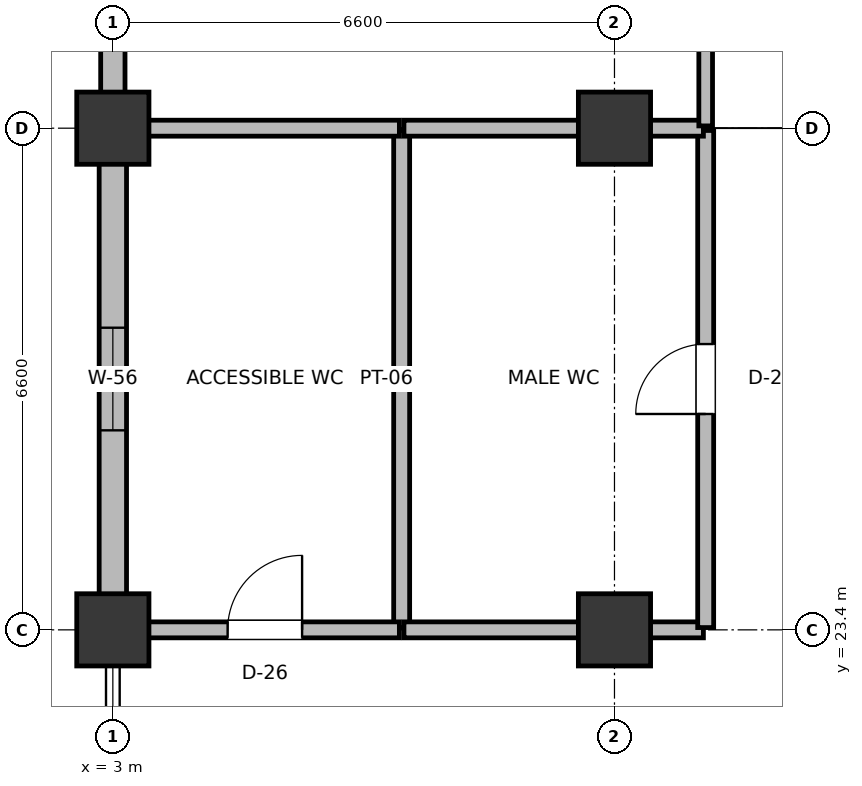
"""IFC4 building model, lengths in metres.
Left out: names, types, materials, properties, quantities, classifications, styles, units other than length and angle.
Written with IfcOpenShell. Run it as: python <this file> out.ifc"""

import sys

from ifc_helpers import new_model, si_unit, direction, frame, frame_2d, origin, origin_2d, place, context, subcontext, project, spatial, rectangle, extrude, element, fill, save


model = new_model("IFC4")
c1 = context("Model", 3, precision=1e-05, world=origin(), true_north=direction((0.0, 1.0)))
c2 = subcontext(c1, "Body", "Model", "MODEL_VIEW")
j1 = project(units=[si_unit("LENGTHUNIT", "METRE"), si_unit("PLANEANGLEUNIT", "RADIAN")], contexts=[c1])
p1 = place(None, origin())
s1 = spatial("IfcSite", under=j1, at=p1, CompositionType="ELEMENT")
p2 = place(p1, origin())
s2 = spatial("IfcBuilding", under=s1, at=p2, CompositionType="ELEMENT")
p3 = place(p2, frame((0.0, 0.0, 15.0)))
s3 = spatial("IfcBuildingStorey", under=s2, at=p3, CompositionType="ELEMENT", Elevation=15.0)
for number, where, z_axis, x_axis in (
    (1, (3.0, 23.4, 0.0), (0.0, 0.0, 1.0), (1.0, 0.0, 0.0)),
    (2, (3.0, 30.0, 0.0), (0.0, 0.0, 1.0), (1.0, 0.0, 0.0)),
    (3, (9.6, 23.4, 0.0), (0.0, 0.0, 1.0), (1.0, 0.0, 0.0)),
    (4, (9.6, 30.0, 0.0), (0.0, 0.0, 1.0), (1.0, 0.0, 0.0)),
):
    element("IfcColumn", number, at=place(p3, frame(where, z_axis=z_axis, x_axis=x_axis)), inside=s3, PredefinedType="COLUMN", context=c2, shape_type="SweptSolid", body=[
        extrude(rectangle(XDim=0.95, YDim=0.95, at=origin_2d()), origin(), (0.0, 0.0, 1.0), 4.5),
    ])
p4 = place(p3, frame((3.0, 23.855, 0.0), z_axis=(0.0, 0.0, 1.0), x_axis=(0.0, 1.0, 0.0)))
e5 = element("IfcWall", 5, at=p4, inside=s3, PredefinedType="SOLIDWALL", context=c2, shape_type="SweptSolid", body=[
    extrude(rectangle(XDim=5.69, YDim=0.36, at=frame_2d((2.845, 0.0))), origin(), (0.0, 0.0, 1.0), 3.575),
])
p5 = place(p4, frame((2.17, 0.0, 0.9)))
e6 = element("IfcOpeningElement", 6, at=p5, cuts=e5, PredefinedType="OPENING", context=c2, shape_type="SweptSolid", body=[
    extrude(rectangle(XDim=1.35, YDim=1.75, at=frame_2d((0.675, 0.875))), frame((0.0, 0.19, 0.0), z_axis=(0.0, -1.0, 0.0), x_axis=(1.0, 0.0, 0.0)), (0.0, 0.0, 1.0), 0.38),
])
p6 = place(p3, frame((3.0, 30.455, 0.0), z_axis=(0.0, 0.0, 1.0), x_axis=(0.0, 1.0, 0.0)))
e7 = element("IfcWall", 7, at=p6, inside=s3, PredefinedType="SOLIDWALL", context=c2, shape_type="SweptSolid", body=[
    extrude(rectangle(XDim=8.16, YDim=0.32, at=frame_2d((4.08, 0.0))), origin(), (0.0, 0.0, 1.0), 3.475),
])
p7 = place(p6, frame((3.305, 0.0, 0.9)))
e8 = element("IfcOpeningElement", 8, at=p7, cuts=e7, PredefinedType="OPENING", context=c2, shape_type="SweptSolid", body=[
    extrude(rectangle(XDim=1.55, YDim=1.35, at=frame_2d((0.775, 0.675))), frame((0.0, 0.17, 0.0), z_axis=(0.0, -1.0, 0.0), x_axis=(1.0, 0.0, 0.0)), (0.0, 0.0, 1.0), 0.34),
])
p8 = place(p3, frame((6.8, 23.43, 0.0), z_axis=(0.0, 0.0, 1.0), x_axis=(0.0, 1.0, 0.0)))
e9 = element("IfcWall", 9, at=p8, inside=s3, PredefinedType="PLUMBINGWALL", context=c2, shape_type="SweptSolid", body=[
    extrude(rectangle(XDim=6.54, YDim=0.21, at=frame_2d((3.27, 0.0))), origin(), (0.0, 0.0, 1.0), 3.425),
])
p9 = place(p3, frame((3.23, 23.4, 0.0), z_axis=(0.0, 0.0, 1.0), x_axis=(1.0, 0.0, 0.0)))
e10 = element("IfcWall", 10, at=p9, inside=s3, PredefinedType="PLUMBINGWALL", context=c2, shape_type="SweptSolid", body=[
    extrude(rectangle(XDim=3.54, YDim=0.21, at=frame_2d((1.77, 0.0))), origin(), (0.0, 0.0, 1.0), 3.525),
])
p10 = place(p9, frame((1.28, 0.0, 0.0)))
e11 = element("IfcOpeningElement", 11, at=p10, cuts=e10, PredefinedType="OPENING", context=c2, shape_type="SweptSolid", body=[
    extrude(rectangle(XDim=0.98, YDim=2.1, at=frame_2d((0.49, 1.05))), frame((0.0, 0.115, 0.0), z_axis=(0.0, -1.0, 0.0), x_axis=(1.0, 0.0, 0.0)), (0.0, 0.0, 1.0), 0.23),
])
p11 = place(p3, frame((3.23, 30.0, 0.0), z_axis=(0.0, 0.0, 1.0), x_axis=(1.0, 0.0, 0.0)))
e12 = element("IfcWall", 12, at=p11, inside=s3, PredefinedType="PLUMBINGWALL", context=c2, shape_type="SweptSolid", body=[
    extrude(rectangle(XDim=3.54, YDim=0.21, at=frame_2d((1.77, 0.0))), origin(), (0.0, 0.0, 1.0), 3.425),
])
p12 = place(p3, frame((6.83, 23.4, 0.0), z_axis=(0.0, 0.0, 1.0), x_axis=(1.0, 0.0, 0.0)))
e13 = element("IfcWall", 13, at=p12, inside=s3, PredefinedType="PLUMBINGWALL", context=c2, shape_type="SweptSolid", body=[
    extrude(rectangle(XDim=3.94, YDim=0.21, at=frame_2d((1.97, 0.0))), origin(), (0.0, 0.0, 1.0), 3.355),
])
p13 = place(p3, frame((10.8, 23.43, 0.0), z_axis=(0.0, 0.0, 1.0), x_axis=(0.0, 1.0, 0.0)))
e14 = element("IfcWall", 14, at=p13, inside=s3, PredefinedType="PLUMBINGWALL", context=c2, shape_type="SweptSolid", body=[
    extrude(rectangle(XDim=6.54, YDim=0.21, at=frame_2d((3.27, 0.0))), origin(), (0.0, 0.0, 1.0), 3.355),
])
p14 = place(p13, frame((2.81, 0.0, 0.0)))
e15 = element("IfcOpeningElement", 15, at=p14, cuts=e14, PredefinedType="OPENING", context=c2, shape_type="SweptSolid", body=[
    extrude(rectangle(XDim=0.92, YDim=2.1, at=frame_2d((0.46, 1.05))), frame((0.0, 0.115, 0.0), z_axis=(0.0, -1.0, 0.0), x_axis=(1.0, 0.0, 0.0)), (0.0, 0.0, 1.0), 0.23),
])
p15 = place(p3, frame((6.83, 30.0, 0.0), z_axis=(0.0, 0.0, 1.0), x_axis=(1.0, 0.0, 0.0)))
e16 = element("IfcWall", 16, at=p15, inside=s3, PredefinedType="PLUMBINGWALL", context=c2, shape_type="SweptSolid", body=[
    extrude(rectangle(XDim=3.94, YDim=0.21, at=frame_2d((1.97, 0.0))), origin(), (0.0, 0.0, 1.0), 3.395),
])
p16 = place(p3, frame((10.8, 30.03, 0.0), z_axis=(0.0, 0.0, 1.0), x_axis=(0.0, 1.0, 0.0)))
e17 = element("IfcWall", 17, at=p16, inside=s3, PredefinedType="PARTITIONING", context=c2, shape_type="SweptSolid", body=[
    extrude(rectangle(XDim=15.74, YDim=0.18, at=frame_2d((7.87, 0.0))), origin(), (0.0, 0.0, 1.0), 3.295),
])
p17 = place(p16, frame((6.99, 0.0, 0.0)))
e18 = element("IfcOpeningElement", 18, at=p17, cuts=e17, PredefinedType="OPENING", context=c2, shape_type="SweptSolid", body=[
    extrude(rectangle(XDim=1.4, YDim=2.2, at=frame_2d((0.7, 1.1))), frame((0.0, 0.1, 0.0), z_axis=(0.0, -1.0, 0.0), x_axis=(1.0, 0.0, 0.0)), (0.0, 0.0, 1.0), 0.2),
])
p18 = place(p5, origin())
e19 = element("IfcWindow", 19, at=p18, inside=s3, PartitioningType="DOUBLE_PANEL_VERTICAL", PredefinedType="WINDOW", context=c2, shape_type="SweptSolid", body=[
    extrude(rectangle(XDim=1.35, YDim=1.75, at=frame_2d((0.675, 0.875))), frame((0.0, 0.03, 0.0), z_axis=(0.0, -1.0, 0.0), x_axis=(1.0, 0.0, 0.0)), (0.0, 0.0, 1.0), 0.06),
])
fill(e6, e19)
p19 = place(p10, origin())
e20 = element("IfcDoor", 20, at=p19, inside=s3, OperationType="SINGLE_SWING_RIGHT", PredefinedType="DOOR", context=c2, shape_type="SweptSolid", body=[
    extrude(rectangle(XDim=0.98, YDim=2.1, at=frame_2d((0.49, 1.05))), frame((0.0, 0.025, 0.0), z_axis=(0.0, -1.0, 0.0), x_axis=(1.0, 0.0, 0.0)), (0.0, 0.0, 1.0), 0.05),
])
fill(e11, e20)
p20 = place(p14, origin())
e21 = element("IfcDoor", 21, at=p20, inside=s3, OperationType="SINGLE_SWING_LEFT", PredefinedType="DOOR", context=c2, shape_type="SweptSolid", body=[
    extrude(rectangle(XDim=0.92, YDim=2.1, at=frame_2d((0.46, 1.05))), frame((0.0, 0.025, 0.0), z_axis=(0.0, -1.0, 0.0), x_axis=(1.0, 0.0, 0.0)), (0.0, 0.0, 1.0), 0.05),
])
fill(e15, e21)
save(model, sys.argv[1])
